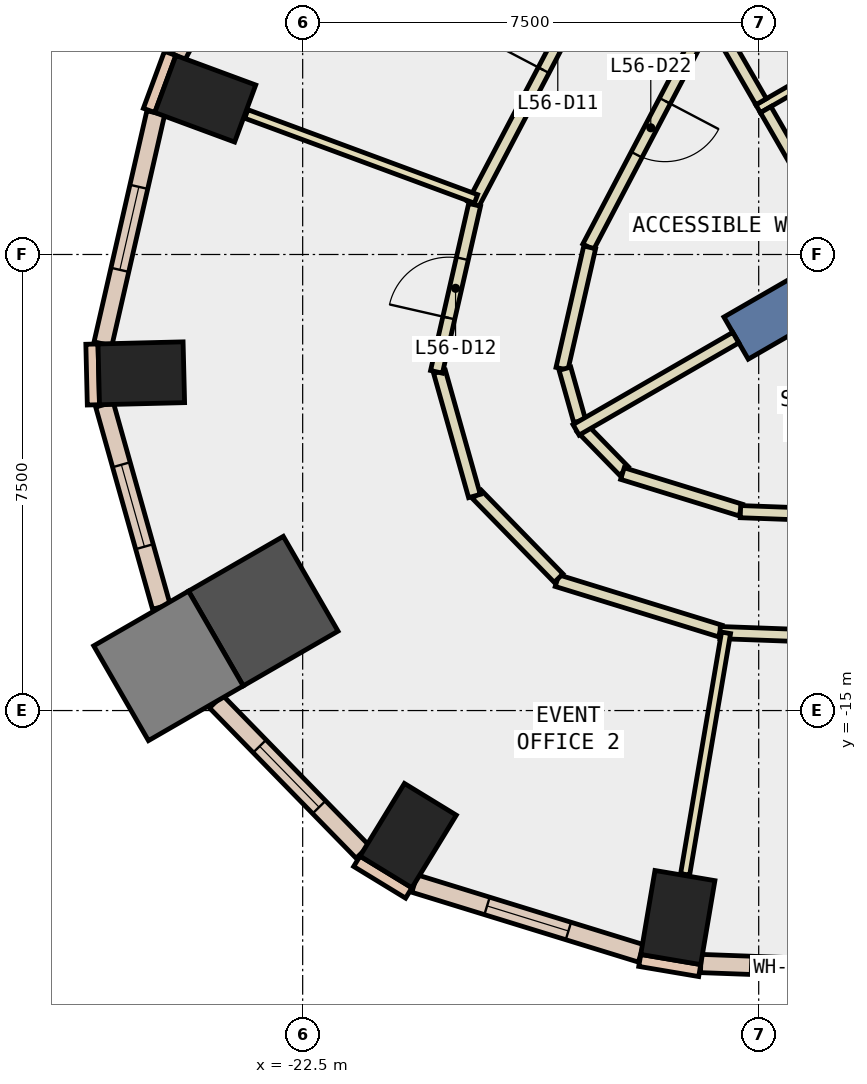
"""IFC4 building model, lengths in metres.
Left out: names, types, materials, properties, quantities, classifications, styles, units other than length and angle.
Written with IfcOpenShell. Run it as: python <this file> out.ifc"""

import sys

from ifc_helpers import new_model, si_unit, direction, frame, frame_2d, origin, origin_2d, place, context, subcontext, project, spatial, rectangle, extrude, element, fill, save


model = new_model("IFC4")
c1 = context("Model", 3, precision=1e-05, world=origin(), true_north=direction((0.0, 1.0)))
c2 = subcontext(c1, "Body", "Model", "MODEL_VIEW")
j1 = project(units=[si_unit("LENGTHUNIT", "METRE"), si_unit("PLANEANGLEUNIT", "RADIAN")], contexts=[c1])
p1 = place(None, origin())
s1 = spatial("IfcSite", under=j1, at=p1, CompositionType="ELEMENT")
p2 = place(p1, origin())
s2 = spatial("IfcBuilding", under=s1, at=p2, CompositionType="ELEMENT")
p3 = place(p2, frame((0.0, 0.0, 248.6)))
s3 = spatial("IfcBuildingStorey", under=s2, at=p3, CompositionType="ELEMENT", Elevation=248.6)
for number, where, z_axis, x_axis in (
    (1, (-16.33, -18.404, -0.34), (0.0, 0.0, 1.0), (-0.986, 0.167, 0.0)),
    (2, (-24.102, -4.939, -0.34), (0.0, 0.0, 1.0), (0.347, 0.938, 0.0)),
    (3, (-25.154, -9.454, -0.34), (0.0, 0.0, 1.0), (-0.025, 1.0, 0.0)),
):
    element("IfcColumn", number, at=place(p3, frame(where, z_axis=z_axis, x_axis=x_axis)), inside=s3, PredefinedType="COLUMN", context=c2, shape_type="SweptSolid", body=[
        extrude(rectangle(XDim=1.0, YDim=1.4, at=origin_2d()), origin(), (0.0, 0.0, 1.0), 3.6),
    ])
p4 = place(p3, frame((-23.148, -13.365, -0.34), z_axis=(0.0, 0.0, 1.0), x_axis=(0.866025403784, 0.5, 0.0)))
e4 = element("IfcColumn", 4, at=p4, inside=s3, PredefinedType="COLUMN", context=c2, shape_type="SweptSolid", body=[
    extrude(rectangle(XDim=1.8, YDim=1.8, at=origin_2d()), origin(), (0.0, 0.0, 1.0), 3.6),
])
p5 = place(p3, frame((-20.765, -17.057, -0.34), z_axis=(0.0, 0.0, 1.0), x_axis=(-0.853341581839, 0.521352227103, 0.0)))
e5 = element("IfcColumn", 5, at=p5, inside=s3, PredefinedType="COLUMN", context=c2, shape_type="SweptSolid", body=[
    extrude(rectangle(XDim=1.0, YDim=1.4, at=origin_2d()), origin(), (0.0, 0.0, 1.0), 3.6),
])
p6 = place(p3, frame((-24.707, -14.265, -0.34), z_axis=(0.0, 0.0, 1.0), x_axis=(0.866025403784, 0.5, 0.0)))
e6 = element("IfcColumn", 6, at=p6, inside=s3, PredefinedType="COLUMN", context=c2, shape_type="SweptSolid", body=[
    extrude(rectangle(XDim=1.8, YDim=1.8, at=origin_2d()), origin(), (0.0, 0.0, 1.0), 3.6),
])
p7 = place(p3, frame((-7.578, -4.375, -0.34), z_axis=(0.0, 0.0, 1.0), x_axis=(-0.866024315419, -0.5000018851, 0.0)))
e7 = element("IfcWall", 7, at=p7, inside=s3, PredefinedType="SHEAR", context=c2, shape_type="SweptSolid", body=[
    extrude(rectangle(XDim=9.0, YDim=0.8, at=frame_2d((4.5, 0.0))), origin(), (0.0, 0.0, 1.0), 3.6),
])
p8 = place(p3, frame((-24.679, -4.193, 0.0), z_axis=(0.0, 0.0, 1.0), x_axis=(-0.346892928577, -0.937904737222, 0.0)))
e8 = element("IfcWall", 8, at=p8, inside=s3, PredefinedType="STANDARD", context=c2, shape_type="SweptSolid", body=[
    extrude(rectangle(XDim=1.0, YDim=0.2, at=frame_2d((0.5, 0.0))), origin(), (0.0, 0.0, 1.0), 3.26),
])
p9 = place(p3, frame((-16.956, -19.109, 0.0), z_axis=(0.0, 0.0, 1.0), x_axis=(0.985961725342, -0.166971483074, 0.0)))
e9 = element("IfcWall", 9, at=p9, inside=s3, PredefinedType="STANDARD", context=c2, shape_type="SweptSolid", body=[
    extrude(rectangle(XDim=1.0, YDim=0.2, at=frame_2d((0.5, 0.0))), origin(), (0.0, 0.0, 1.0), 3.26),
])
p10 = place(p3, frame((-25.966, -8.974, 0.0), z_axis=(0.0, 0.0, 1.0), x_axis=(0.024192379573, -0.999707321555, 0.0)))
e10 = element("IfcWall", 10, at=p10, inside=s3, PredefinedType="STANDARD", context=c2, shape_type="SweptSolid", body=[
    extrude(rectangle(XDim=0.999, YDim=0.2, at=frame_2d((0.5, 0.0))), origin(), (0.0, 0.0, 1.0), 3.26),
])
p11 = place(p3, frame((-21.609, -17.479, 0.0), z_axis=(0.0, 0.0, 1.0), x_axis=(0.853679739553, -0.520798331677, 0.0)))
e11 = element("IfcWall", 11, at=p11, inside=s3, PredefinedType="STANDARD", context=c2, shape_type="SweptSolid", body=[
    extrude(rectangle(XDim=1.0, YDim=0.2, at=frame_2d((0.5, 0.0))), origin(), (0.0, 0.0, 1.0), 3.26),
])
p12 = place(p3, frame((-15.952, -19.16, 0.0), z_axis=(0.0, 0.0, 1.0), x_axis=(0.999331753125, -0.036551979363, 0.0)))
e12 = element("IfcWall", 12, at=p12, inside=s3, PredefinedType="STANDARD", context=c2, shape_type="SweptSolid", body=[
    extrude(rectangle(XDim=7.661, YDim=0.3, at=frame_2d((3.831, 0.0))), origin(), (0.0, 0.0, 1.0), 3.26),
])
p13 = place(p12, frame((0.815, 0.0, 0.9)))
e13 = element("IfcOpeningElement", 13, at=p13, cuts=e12, PredefinedType="OPENING", context=c2, shape_type="SweptSolid", body=[
    extrude(rectangle(XDim=2.2, YDim=2.0, at=frame_2d((1.1, 1.0))), frame((0.0, 0.16, 0.0), z_axis=(0.0, -1.0, 0.0), x_axis=(1.0, 0.0, 0.0)), (0.0, 0.0, 1.0), 0.32),
])
p14 = place(p12, frame((4.646, 0.0, 0.9)))
e14 = element("IfcOpeningElement", 14, at=p14, cuts=e12, PredefinedType="OPENING", context=c2, shape_type="SweptSolid", body=[
    extrude(rectangle(XDim=2.2, YDim=2.0, at=frame_2d((1.1, 1.0))), frame((0.0, 0.16, 0.0), z_axis=(0.0, -1.0, 0.0), x_axis=(1.0, 0.0, 0.0)), (0.0, 0.0, 1.0), 0.32),
])
p15 = place(p3, frame((-21.978, 0.698, 0.0), z_axis=(0.0, 0.0, 1.0), x_axis=(-0.465228032148, -0.885190871001, 0.0)))
e15 = element("IfcWall", 15, at=p15, inside=s3, PredefinedType="STANDARD", context=c2, shape_type="SweptSolid", body=[
    extrude(rectangle(XDim=5.572, YDim=0.3, at=frame_2d((2.786, 0.0))), origin(), (0.0, 0.0, 1.0), 3.26),
])
p16 = place(p15, frame((0.693, 0.0, 0.9)))
e16 = element("IfcOpeningElement", 16, at=p16, cuts=e15, PredefinedType="OPENING", context=c2, shape_type="SweptSolid", body=[
    extrude(rectangle(XDim=1.4, YDim=2.0, at=frame_2d((0.7, 1.0))), frame((0.0, 0.16, 0.0), z_axis=(0.0, -1.0, 0.0), x_axis=(1.0, 0.0, 0.0)), (0.0, 0.0, 1.0), 0.32),
])
p17 = place(p15, frame((3.479, 0.0, 0.9)))
e17 = element("IfcOpeningElement", 17, at=p17, cuts=e15, PredefinedType="OPENING", context=c2, shape_type="SweptSolid", body=[
    extrude(rectangle(XDim=1.4, YDim=2.0, at=frame_2d((0.7, 1.0))), frame((0.0, 0.16, 0.0), z_axis=(0.0, -1.0, 0.0), x_axis=(1.0, 0.0, 0.0)), (0.0, 0.0, 1.0), 0.32),
])
p18 = place(p3, frame((-24.916, -5.17, 0.0), z_axis=(0.0, 0.0, 1.0), x_axis=(-0.222901327396, -0.974841011778, 0.0)))
e18 = element("IfcWall", 18, at=p18, inside=s3, PredefinedType="STANDARD", context=c2, shape_type="SweptSolid", body=[
    extrude(rectangle(XDim=3.898, YDim=0.3, at=frame_2d((1.949, 0.0))), origin(), (0.0, 0.0, 1.0), 3.26),
])
p19 = place(p18, frame((1.249, 0.0, 0.9)))
e19 = element("IfcOpeningElement", 19, at=p19, cuts=e18, PredefinedType="OPENING", context=c2, shape_type="SweptSolid", body=[
    extrude(rectangle(XDim=1.4, YDim=2.0, at=frame_2d((0.7, 1.0))), frame((0.0, 0.16, 0.0), z_axis=(0.0, -1.0, 0.0), x_axis=(1.0, 0.0, 0.0)), (0.0, 0.0, 1.0), 0.32),
])
p20 = place(p3, frame((-25.76, -9.968, 0.0), z_axis=(0.0, 0.0, 1.0), x_axis=(0.270837632743, -0.962625044703, 0.0)))
e20 = element("IfcWall", 20, at=p20, inside=s3, PredefinedType="STANDARD", context=c2, shape_type="SweptSolid", body=[
    extrude(rectangle(XDim=3.456, YDim=0.3, at=frame_2d((1.728, 0.0))), origin(), (0.0, 0.0, 1.0), 3.26),
])
p21 = place(p20, frame((1.028, 0.0, 0.9)))
e21 = element("IfcOpeningElement", 21, at=p21, cuts=e20, PredefinedType="OPENING", context=c2, shape_type="SweptSolid", body=[
    extrude(rectangle(XDim=1.4, YDim=2.0, at=frame_2d((0.7, 1.0))), frame((0.0, 0.16, 0.0), z_axis=(0.0, -1.0, 0.0), x_axis=(1.0, 0.0, 0.0)), (0.0, 0.0, 1.0), 0.32),
])
p22 = place(p3, frame((-23.925, -14.852, 0.0), z_axis=(0.0, 0.0, 1.0), x_axis=(0.698394514831, -0.715713002294, 0.0)))
e22 = element("IfcWall", 22, at=p22, inside=s3, PredefinedType="STANDARD", context=c2, shape_type="SweptSolid", body=[
    extrude(rectangle(XDim=3.454, YDim=0.3, at=frame_2d((1.727, 0.0))), origin(), (0.0, 0.0, 1.0), 3.26),
])
p23 = place(p22, frame((1.027, 0.0, 0.9)))
e23 = element("IfcOpeningElement", 23, at=p23, cuts=e22, PredefinedType="OPENING", context=c2, shape_type="SweptSolid", body=[
    extrude(rectangle(XDim=1.4, YDim=2.0, at=frame_2d((0.7, 1.0))), frame((0.0, 0.16, 0.0), z_axis=(0.0, -1.0, 0.0), x_axis=(1.0, 0.0, 0.0)), (0.0, 0.0, 1.0), 0.32),
])
p24 = place(p3, frame((-20.661, -17.845, 0.0), z_axis=(0.0, 0.0, 1.0), x_axis=(0.955646189569, -0.2945171648, 0.0)))
e24 = element("IfcWall", 24, at=p24, inside=s3, PredefinedType="STANDARD", context=c2, shape_type="SweptSolid", body=[
    extrude(rectangle(XDim=3.898, YDim=0.3, at=frame_2d((1.949, 0.0))), origin(), (0.0, 0.0, 1.0), 3.26),
])
p25 = place(p24, frame((1.249, 0.0, 0.9)))
e25 = element("IfcOpeningElement", 25, at=p25, cuts=e24, PredefinedType="OPENING", context=c2, shape_type="SweptSolid", body=[
    extrude(rectangle(XDim=1.4, YDim=2.0, at=frame_2d((0.7, 1.0))), frame((0.0, 0.16, 0.0), z_axis=(0.0, -1.0, 0.0), x_axis=(1.0, 0.0, 0.0)), (0.0, 0.0, 1.0), 0.32),
])
p26 = place(p3, frame((-15.746, -3.458, 0.0), z_axis=(0.0, 0.0, 1.0), x_axis=(-0.465179971699, -0.885216128372, 0.0)))
e26 = element("IfcWall", 26, at=p26, inside=s3, PredefinedType="PARTITIONING", context=c2, shape_type="SweptSolid", body=[
    extrude(rectangle(XDim=4.424, YDim=0.2, at=frame_2d((2.212, 0.0))), origin(), (0.0, 0.0, 1.0), 3.26),
])
p27 = place(p26, frame((1.712, 0.0, 0.0)))
e27 = element("IfcOpeningElement", 27, at=p27, cuts=e26, PredefinedType="OPENING", context=c2, shape_type="SweptSolid", body=[
    extrude(rectangle(XDim=1.0, YDim=2.1, at=frame_2d((0.5, 1.05))), frame((0.0, 0.11, 0.0), z_axis=(0.0, -1.0, 0.0), x_axis=(1.0, 0.0, 0.0)), (0.0, 0.0, 1.0), 0.22),
])
p28 = place(p3, frame((-17.78, -7.383, 0.0), z_axis=(0.0, 0.0, 1.0), x_axis=(-0.222760041204, -0.974873306662, 0.0)))
e28 = element("IfcWall", 28, at=p28, inside=s3, PredefinedType="PARTITIONING", context=c2, shape_type="SweptSolid", body=[
    extrude(rectangle(XDim=2.047, YDim=0.2, at=frame_2d((1.024, 0.0))), origin(), (0.0, 0.0, 1.0), 3.26),
])
p29 = place(p3, frame((-18.187, -9.378, 0.0), z_axis=(0.0, 0.0, 1.0), x_axis=(0.270785141481, -0.962639811743, 0.0)))
e29 = element("IfcWall", 29, at=p29, inside=s3, PredefinedType="PARTITIONING", context=c2, shape_type="SweptSolid", body=[
    extrude(rectangle(XDim=0.894, YDim=0.2, at=frame_2d((0.447, 0.0))), origin(), (0.0, 0.0, 1.0), 3.26),
])
p30 = place(p3, frame((-17.915, -10.344, 0.0), z_axis=(0.0, 0.0, 1.0), x_axis=(0.698527813511, -0.715582904877, 0.0)))
e30 = element("IfcWall", 30, at=p30, inside=s3, PredefinedType="PARTITIONING", context=c2, shape_type="SweptSolid", body=[
    extrude(rectangle(XDim=1.002, YDim=0.2, at=frame_2d((0.501, 0.0))), origin(), (0.0, 0.0, 1.0), 3.26),
])
p31 = place(p3, frame((-17.241, -11.103, 0.0), z_axis=(0.0, 0.0, 1.0), x_axis=(0.95563113363, -0.294566013716, 0.0)))
e31 = element("IfcWall", 31, at=p31, inside=s3, PredefinedType="PARTITIONING", context=c2, shape_type="SweptSolid", body=[
    extrude(rectangle(XDim=2.036, YDim=0.2, at=frame_2d((1.018, 0.0))), origin(), (0.0, 0.0, 1.0), 3.26),
])
p32 = place(p3, frame((-15.3, -11.729, 0.0), z_axis=(0.0, 0.0, 1.0), x_axis=(0.999326350165, -0.036699398722, 0.0)))
e32 = element("IfcWall", 32, at=p32, inside=s3, PredefinedType="PARTITIONING", context=c2, shape_type="SweptSolid", body=[
    extrude(rectangle(XDim=4.251, YDim=0.2, at=frame_2d((2.125, 0.0))), origin(), (0.0, 0.0, 1.0), 3.26),
])
p33 = place(p32, frame((1.7, 0.0, 0.0)))
e33 = element("IfcOpeningElement", 33, at=p33, cuts=e32, PredefinedType="OPENING", context=c2, shape_type="SweptSolid", body=[
    extrude(rectangle(XDim=1.0, YDim=2.1, at=frame_2d((0.5, 1.05))), frame((0.0, 0.11, 0.0), z_axis=(0.0, -1.0, 0.0), x_axis=(1.0, 0.0, 0.0)), (0.0, 0.0, 1.0), 0.22),
])
p34 = place(p3, frame((-19.696, -6.675, 0.0), z_axis=(0.0, 0.0, 1.0), x_axis=(0.465165163774, 0.88522390976, 0.0)))
e34 = element("IfcWall", 34, at=p34, inside=s3, PredefinedType="PARTITIONING", context=c2, shape_type="SweptSolid", body=[
    extrude(rectangle(XDim=5.835, YDim=0.2, at=frame_2d((2.917, 0.0))), origin(), (0.0, 0.0, 1.0), 3.26),
])
p35 = place(p34, frame((2.492, 0.0, 0.0)))
e35 = element("IfcOpeningElement", 35, at=p35, cuts=e34, PredefinedType="OPENING", context=c2, shape_type="SweptSolid", body=[
    extrude(rectangle(XDim=1.0, YDim=2.1, at=frame_2d((0.5, 1.05))), frame((0.0, 0.11, 0.0), z_axis=(0.0, -1.0, 0.0), x_axis=(1.0, 0.0, 0.0)), (0.0, 0.0, 1.0), 0.22),
])
p36 = place(p3, frame((-15.632, -13.692, 0.0), z_axis=(0.0, 0.0, 1.0), x_axis=(-0.955600342663, 0.294665887239, 0.0)))
e36 = element("IfcWall", 36, at=p36, inside=s3, PredefinedType="PARTITIONING", context=c2, shape_type="SweptSolid", body=[
    extrude(rectangle(XDim=2.81, YDim=0.2, at=frame_2d((1.405, 0.0))), origin(), (0.0, 0.0, 1.0), 3.26),
])
p37 = place(p3, frame((-18.291, -12.822, 0.0), z_axis=(0.0, 0.0, 1.0), x_axis=(-0.698477855606, 0.715631668687, 0.0)))
e37 = element("IfcWall", 37, at=p37, inside=s3, PredefinedType="PARTITIONING", context=c2, shape_type="SweptSolid", body=[
    extrude(rectangle(XDim=1.921, YDim=0.2, at=frame_2d((0.961, 0.0))), origin(), (0.0, 0.0, 1.0), 3.26),
])
p38 = place(p3, frame((-19.675, -11.472, 0.0), z_axis=(0.0, 0.0, 1.0), x_axis=(-0.270905475888, 0.962605954238, 0.0)))
e38 = element("IfcWall", 38, at=p38, inside=s3, PredefinedType="PARTITIONING", context=c2, shape_type="SweptSolid", body=[
    extrude(rectangle(XDim=2.122, YDim=0.2, at=frame_2d((1.061, 0.0))), origin(), (0.0, 0.0, 1.0), 3.26),
])
p39 = place(p3, frame((-20.299, -9.43, 0.0), z_axis=(0.0, 0.0, 1.0), x_axis=(0.222523624687, 0.974927298036, 0.0)))
e39 = element("IfcWall", 39, at=p39, inside=s3, PredefinedType="PARTITIONING", context=c2, shape_type="SweptSolid", body=[
    extrude(rectangle(XDim=2.817, YDim=0.2, at=frame_2d((1.409, 0.0))), origin(), (0.0, 0.0, 1.0), 3.26),
])
p40 = place(p39, frame((0.909, 0.0, 0.0)))
e40 = element("IfcOpeningElement", 40, at=p40, cuts=e39, PredefinedType="OPENING", context=c2, shape_type="SweptSolid", body=[
    extrude(rectangle(XDim=1.0, YDim=2.1, at=frame_2d((0.5, 1.05))), frame((0.0, 0.11, 0.0), z_axis=(0.0, -1.0, 0.0), x_axis=(1.0, 0.0, 0.0)), (0.0, 0.0, 1.0), 0.22),
])
p41 = place(p3, frame((-7.7, -14.008, 0.0), z_axis=(0.0, 0.0, 1.0), x_axis=(-0.99933282306, 0.036522715615, 0.0)))
e41 = element("IfcWall", 41, at=p41, inside=s3, PredefinedType="PARTITIONING", context=c2, shape_type="SweptSolid", body=[
    extrude(rectangle(XDim=7.941, YDim=0.2, at=frame_2d((3.971, 0.0))), origin(), (0.0, 0.0, 1.0), 3.26),
])
p42 = place(p41, frame((3.471, 0.0, 0.0)))
e42 = element("IfcOpeningElement", 42, at=p42, cuts=e41, PredefinedType="OPENING", context=c2, shape_type="SweptSolid", body=[
    extrude(rectangle(XDim=1.0, YDim=2.1, at=frame_2d((0.5, 1.05))), frame((0.0, 0.11, 0.0), z_axis=(0.0, -1.0, 0.0), x_axis=(1.0, 0.0, 0.0)), (0.0, 0.0, 1.0), 0.22),
])
p43 = place(p3, frame((-10.506, -2.503, 0.0), z_axis=(0.0, 0.0, 1.0), x_axis=(-0.866044872465, -0.49996627774, 0.0)))
e43 = element("IfcWall", 43, at=p43, inside=s3, PredefinedType="PARTITIONING", context=c2, shape_type="SweptSolid", body=[
    extrude(rectangle(XDim=5.2, YDim=0.15, at=frame_2d((2.6, 0.0))), origin(), (0.0, 0.0, 1.0), 3.26),
])
p44 = place(p3, frame((-14.96, -4.988, 0.0), z_axis=(0.0, 0.0, 1.0), x_axis=(-0.500175017317, 0.865924333907, 0.0)))
e44 = element("IfcWall", 44, at=p44, inside=s3, PredefinedType="PARTITIONING", context=c2, shape_type="SweptSolid", body=[
    extrude(rectangle(XDim=1.666, YDim=0.2, at=frame_2d((0.833, 0.0))), origin(), (0.0, 0.0, 1.0), 3.26),
])
p45 = place(p3, frame((-13.58, -7.379, 0.0), z_axis=(0.0, 0.0, 1.0), x_axis=(-0.499870876044, 0.866099940701, 0.0)))
e45 = element("IfcWall", 45, at=p45, inside=s3, PredefinedType="PARTITIONING", context=c2, shape_type="SweptSolid", body=[
    extrude(rectangle(XDim=2.611, YDim=0.2, at=frame_2d((1.305, 0.0))), origin(), (0.0, 0.0, 1.0), 3.26),
])
p46 = place(p3, frame((-15.377, -8.867, 0.0), z_axis=(0.0, 0.0, 1.0), x_axis=(-0.865965767548, -0.500103278768, 0.0)))
e46 = element("IfcWall", 46, at=p46, inside=s3, PredefinedType="PARTITIONING", context=c2, shape_type="SweptSolid", body=[
    extrude(rectangle(XDim=3.033, YDim=0.2, at=frame_2d((1.517, 0.0))), origin(), (0.0, 0.0, 1.0), 3.26),
])
p47 = place(p3, frame((-19.649, -6.586, 0.0), z_axis=(0.0, 0.0, 1.0), x_axis=(-0.937935790958, 0.346808956114, 0.0)))
e47 = element("IfcWall", 47, at=p47, inside=s3, PredefinedType="PARTITIONING", context=c2, shape_type="SweptSolid", body=[
    extrude(rectangle(XDim=4.028, YDim=0.15, at=frame_2d((2.014, 0.0))), origin(), (0.0, 0.0, 1.0), 3.26),
])
p48 = place(p3, frame((-15.537, -13.722, 0.0), z_axis=(0.0, 0.0, 1.0), x_axis=(-0.167012380144, -0.985954798598, 0.0)))
e48 = element("IfcWall", 48, at=p48, inside=s3, PredefinedType="PARTITIONING", context=c2, shape_type="SweptSolid", body=[
    extrude(rectangle(XDim=4.029, YDim=0.15, at=frame_2d((2.014, 0.0))), origin(), (0.0, 0.0, 1.0), 3.26),
])
p49 = place(p13, origin())
e49 = element("IfcWindow", 49, at=p49, inside=s3, PartitioningType="SINGLE_PANEL", PredefinedType="WINDOW", context=c2, shape_type="SweptSolid", body=[
    extrude(rectangle(XDim=2.2, YDim=2.0, at=frame_2d((1.1, 1.0))), frame((0.0, 0.03, 0.0), z_axis=(0.0, -1.0, 0.0), x_axis=(1.0, 0.0, 0.0)), (0.0, 0.0, 1.0), 0.06),
])
fill(e13, e49)
p50 = place(p19, origin())
e50 = element("IfcWindow", 50, at=p50, inside=s3, PartitioningType="SINGLE_PANEL", PredefinedType="WINDOW", context=c2, shape_type="SweptSolid", body=[
    extrude(rectangle(XDim=1.4, YDim=2.0, at=frame_2d((0.7, 1.0))), frame((0.0, 0.03, 0.0), z_axis=(0.0, -1.0, 0.0), x_axis=(1.0, 0.0, 0.0)), (0.0, 0.0, 1.0), 0.06),
])
fill(e19, e50)
p51 = place(p21, origin())
e51 = element("IfcWindow", 51, at=p51, inside=s3, PartitioningType="SINGLE_PANEL", PredefinedType="WINDOW", context=c2, shape_type="SweptSolid", body=[
    extrude(rectangle(XDim=1.4, YDim=2.0, at=frame_2d((0.7, 1.0))), frame((0.0, 0.03, 0.0), z_axis=(0.0, -1.0, 0.0), x_axis=(1.0, 0.0, 0.0)), (0.0, 0.0, 1.0), 0.06),
])
fill(e21, e51)
p52 = place(p23, origin())
e52 = element("IfcWindow", 52, at=p52, inside=s3, PartitioningType="SINGLE_PANEL", PredefinedType="WINDOW", context=c2, shape_type="SweptSolid", body=[
    extrude(rectangle(XDim=1.4, YDim=2.0, at=frame_2d((0.7, 1.0))), frame((0.0, 0.03, 0.0), z_axis=(0.0, -1.0, 0.0), x_axis=(1.0, 0.0, 0.0)), (0.0, 0.0, 1.0), 0.06),
])
fill(e23, e52)
p53 = place(p25, origin())
e53 = element("IfcWindow", 53, at=p53, inside=s3, PartitioningType="SINGLE_PANEL", PredefinedType="WINDOW", context=c2, shape_type="SweptSolid", body=[
    extrude(rectangle(XDim=1.4, YDim=2.0, at=frame_2d((0.7, 1.0))), frame((0.0, 0.03, 0.0), z_axis=(0.0, -1.0, 0.0), x_axis=(1.0, 0.0, 0.0)), (0.0, 0.0, 1.0), 0.06),
])
fill(e25, e53)
p54 = place(p35, origin())
e54 = element("IfcDoor", 54, at=p54, inside=s3, OperationType="SINGLE_SWING_LEFT", PredefinedType="DOOR", context=c2, shape_type="SweptSolid", body=[
    extrude(rectangle(XDim=1.0, YDim=2.1, at=frame_2d((0.5, 1.05))), frame((0.0, 0.025, 0.0), z_axis=(0.0, -1.0, 0.0), x_axis=(1.0, 0.0, 0.0)), (0.0, 0.0, 1.0), 0.05),
])
fill(e35, e54)
p55 = place(p40, origin())
e55 = element("IfcDoor", 55, at=p55, inside=s3, OperationType="SINGLE_SWING_LEFT", PredefinedType="DOOR", context=c2, shape_type="SweptSolid", body=[
    extrude(rectangle(XDim=1.0, YDim=2.1, at=frame_2d((0.5, 1.05))), frame((0.0, 0.025, 0.0), z_axis=(0.0, -1.0, 0.0), x_axis=(1.0, 0.0, 0.0)), (0.0, 0.0, 1.0), 0.05),
])
fill(e40, e55)
p56 = place(p27, origin())
e56 = element("IfcDoor", 56, at=p56, inside=s3, OperationType="SINGLE_SWING_LEFT", PredefinedType="DOOR", context=c2, shape_type="SweptSolid", body=[
    extrude(rectangle(XDim=1.0, YDim=2.1, at=frame_2d((0.5, 1.05))), frame((0.0, 0.025, 0.0), z_axis=(0.0, -1.0, 0.0), x_axis=(1.0, 0.0, 0.0)), (0.0, 0.0, 1.0), 0.05),
])
fill(e27, e56)
save(model, sys.argv[1])
